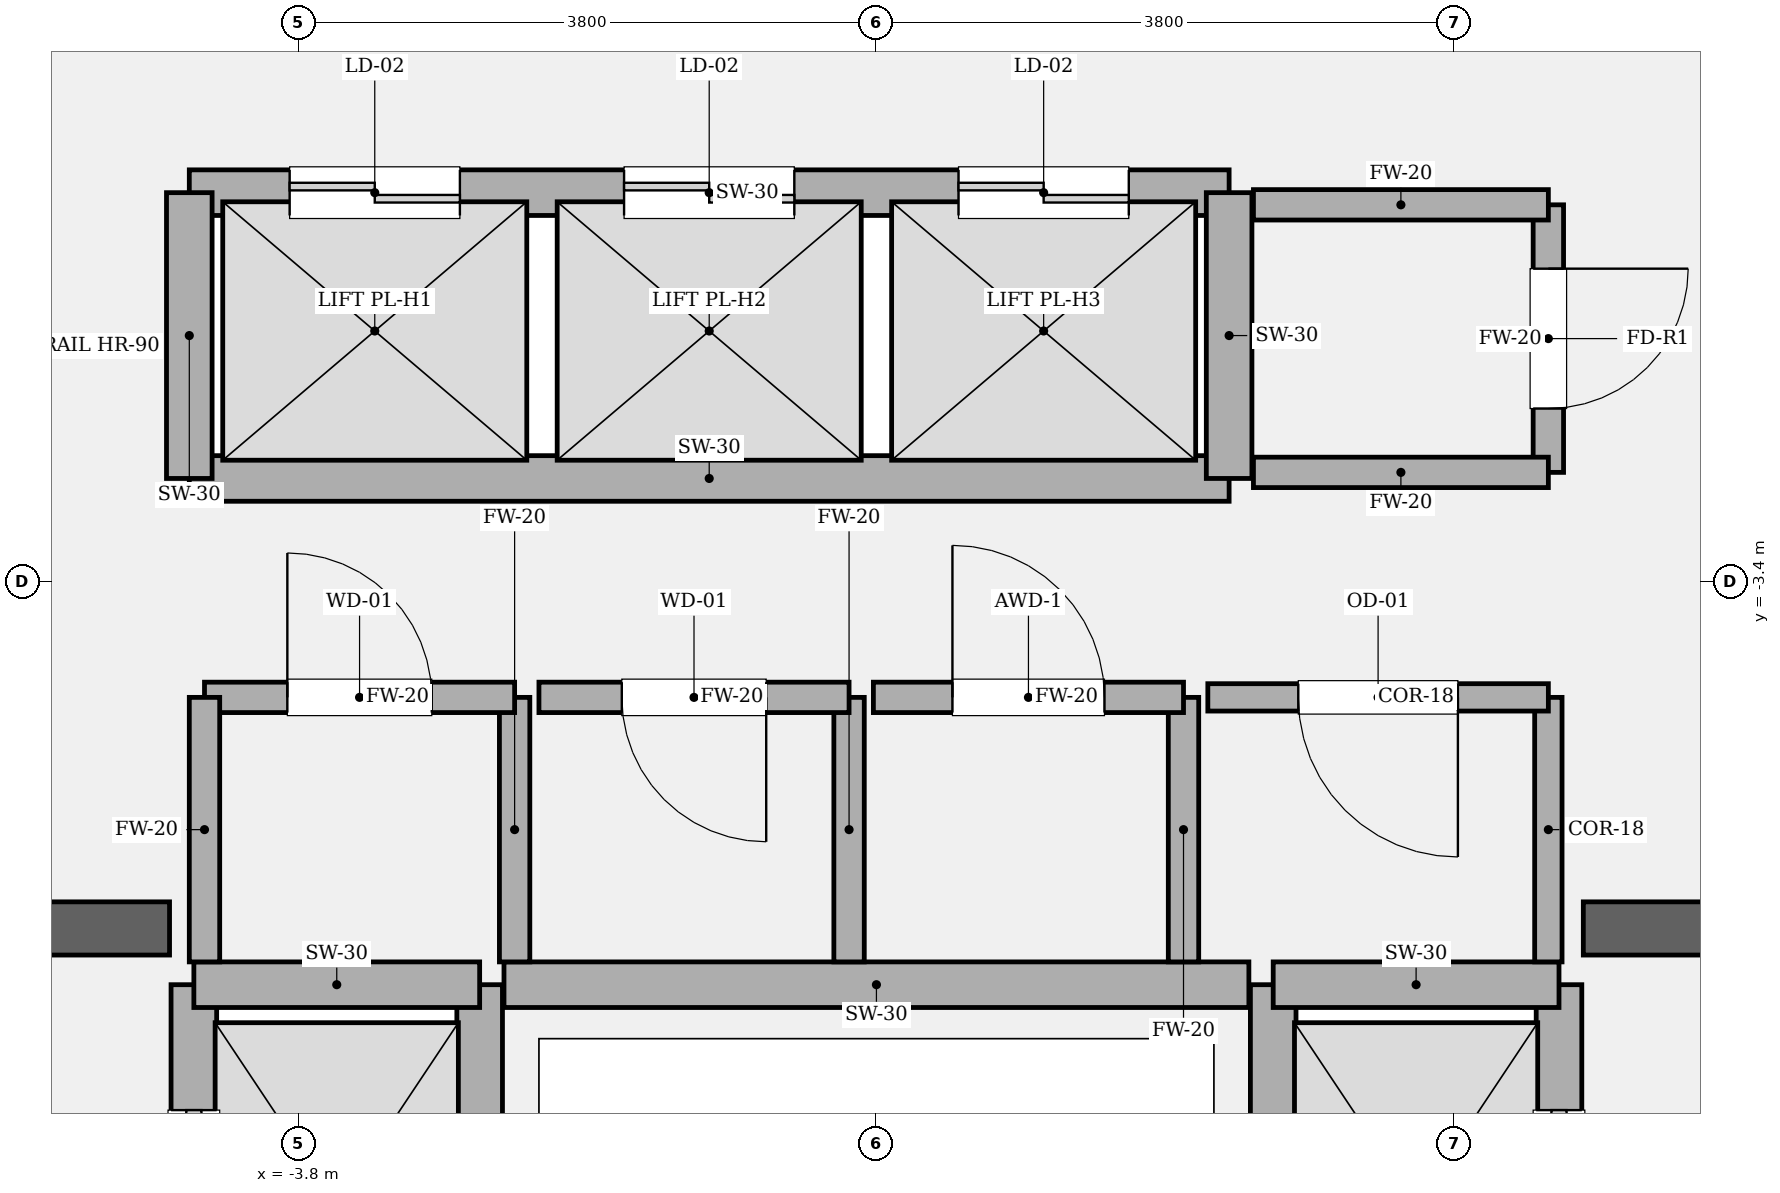
"""IFC4 building model, lengths in metres.
Left out: names, types, materials, properties, quantities, classifications, styles, units other than length and angle.
Written with IfcOpenShell. Run it as: python <this file> out.ifc"""

import sys

from ifc_helpers import new_model, si_unit, direction, frame, frame_2d, origin, place, context, subcontext, project, spatial, rectangle, extrude, element, fill, save


model = new_model("IFC4")
c1 = context("Model", 3, precision=1e-05, world=origin(), true_north=direction((0.0, 1.0)))
c2 = subcontext(c1, "Body", "Model", "MODEL_VIEW")
j1 = project(units=[si_unit("LENGTHUNIT", "METRE"), si_unit("PLANEANGLEUNIT", "RADIAN")], contexts=[c1])
p1 = place(None, origin())
s1 = spatial("IfcSite", under=j1, at=p1, CompositionType="ELEMENT")
p2 = place(p1, origin())
s2 = spatial("IfcBuilding", under=s1, at=p2, CompositionType="ELEMENT")
p3 = place(p2, frame((0.0, 0.0, 279.75)))
s3 = spatial("IfcBuildingStorey", under=s2, at=p3, CompositionType="ELEMENT", Elevation=279.75)
p4 = place(p3, frame((-9.925, -5.68, 0.0), z_axis=(0.0, 0.0, 1.0), x_axis=(1.0, 0.0, 0.0)))
e1 = element("IfcWall", 1, at=p4, inside=s3, PredefinedType="SOLIDWALL", context=c2, shape_type="SweptSolid", body=[
    extrude(rectangle(XDim=5.275, YDim=0.35, at=frame_2d((2.638, 0.0))), origin(), (0.0, 0.0, 1.0), 4.05),
])
p5 = place(p4, frame((1.385, 0.0, 0.0)))
e2 = element("IfcOpeningElement", 2, at=p5, cuts=e1, PredefinedType="OPENING", context=c2, shape_type="SweptSolid", body=[
    extrude(rectangle(XDim=1.18, YDim=2.2, at=frame_2d((0.59, 1.1))), frame((0.0, 0.185, 0.0), z_axis=(0.0, -1.0, 0.0), x_axis=(1.0, 0.0, 0.0)), (0.0, 0.0, 1.0), 0.37),
])
p6 = place(p3, frame((4.65, -5.68, 0.0), z_axis=(0.0, 0.0, 1.0), x_axis=(1.0, 0.0, 0.0)))
e3 = element("IfcWall", 3, at=p6, inside=s3, PredefinedType="SOLIDWALL", context=c2, shape_type="SweptSolid", body=[
    extrude(rectangle(XDim=5.275, YDim=0.35, at=frame_2d((2.638, 0.0))), origin(), (0.0, 0.0, 1.0), 4.05),
])
p7 = place(p6, frame((2.71, 0.0, 0.0)))
e4 = element("IfcOpeningElement", 4, at=p7, cuts=e3, PredefinedType="OPENING", context=c2, shape_type="SweptSolid", body=[
    extrude(rectangle(XDim=1.18, YDim=2.2, at=frame_2d((0.59, 1.1))), frame((0.0, 0.185, 0.0), z_axis=(0.0, -1.0, 0.0), x_axis=(1.0, 0.0, 0.0)), (0.0, 0.0, 1.0), 0.37),
])
p8 = place(p3, frame((-4.49, -8.82, 0.0), z_axis=(0.0, 0.0, 1.0), x_axis=(0.0, 1.0, 0.0)))
e5 = element("IfcWall", 5, at=p8, inside=s3, PredefinedType="SOLIDWALL", context=c2, shape_type="SweptSolid", body=[
    extrude(rectangle(XDim=2.77, YDim=0.3, at=frame_2d((1.385, 0.0))), origin(), (0.0, 0.0, 1.0), 3.77),
])
p9 = place(p8, frame((0.825, 0.0, 0.0)))
e6 = element("IfcOpeningElement", 6, at=p9, cuts=e5, PredefinedType="OPENING", context=c2, shape_type="SweptSolid", body=[
    extrude(rectangle(XDim=1.12, YDim=2.25, at=frame_2d((0.56, 1.125))), frame((0.0, 0.16, 0.0), z_axis=(0.0, -1.0, 0.0), x_axis=(1.0, 0.0, 0.0)), (0.0, 0.0, 1.0), 0.32),
])
p10 = place(p3, frame((-2.61, -8.82, 0.0), z_axis=(0.0, 0.0, 1.0), x_axis=(0.0, 1.0, 0.0)))
e7 = element("IfcWall", 7, at=p10, inside=s3, PredefinedType="SOLIDWALL", context=c2, shape_type="SweptSolid", body=[
    extrude(rectangle(XDim=2.77, YDim=0.3, at=frame_2d((1.385, 0.0))), origin(), (0.0, 0.0, 1.0), 3.77),
])
p11 = place(p3, frame((-4.49, -6.05, 0.0), z_axis=(0.0, 0.0, 1.0), x_axis=(1.0, 0.0, 0.0)))
e8 = element("IfcWall", 8, at=p11, inside=s3, PredefinedType="SOLIDWALL", context=c2, shape_type="SweptSolid", body=[
    extrude(rectangle(XDim=1.88, YDim=0.3, at=frame_2d((0.94, 0.0))), origin(), (0.0, 0.0, 1.0), 3.77),
])
p12 = place(p3, frame((4.49, -8.82, 0.0), z_axis=(0.0, 0.0, 1.0), x_axis=(0.0, 1.0, 0.0)))
e9 = element("IfcWall", 9, at=p12, inside=s3, PredefinedType="SOLIDWALL", context=c2, shape_type="SweptSolid", body=[
    extrude(rectangle(XDim=2.77, YDim=0.3, at=frame_2d((1.385, 0.0))), origin(), (0.0, 0.0, 1.0), 3.77),
])
p13 = place(p12, frame((0.825, 0.0, 0.0)))
e10 = element("IfcOpeningElement", 10, at=p13, cuts=e9, PredefinedType="OPENING", context=c2, shape_type="SweptSolid", body=[
    extrude(rectangle(XDim=1.12, YDim=2.25, at=frame_2d((0.56, 1.125))), frame((0.0, 0.16, 0.0), z_axis=(0.0, -1.0, 0.0), x_axis=(1.0, 0.0, 0.0)), (0.0, 0.0, 1.0), 0.32),
])
p14 = place(p3, frame((2.61, -8.82, 0.0), z_axis=(0.0, 0.0, 1.0), x_axis=(0.0, 1.0, 0.0)))
e11 = element("IfcWall", 11, at=p14, inside=s3, PredefinedType="SOLIDWALL", context=c2, shape_type="SweptSolid", body=[
    extrude(rectangle(XDim=2.77, YDim=0.3, at=frame_2d((1.385, 0.0))), origin(), (0.0, 0.0, 1.0), 3.77),
])
p15 = place(p3, frame((2.61, -6.05, 0.0), z_axis=(0.0, 0.0, 1.0), x_axis=(1.0, 0.0, 0.0)))
e12 = element("IfcWall", 12, at=p15, inside=s3, PredefinedType="SOLIDWALL", context=c2, shape_type="SweptSolid", body=[
    extrude(rectangle(XDim=1.88, YDim=0.3, at=frame_2d((0.94, 0.0))), origin(), (0.0, 0.0, 1.0), 3.77),
])
p16 = place(p3, frame((-4.52, -0.84, 0.0), z_axis=(0.0, 0.0, 1.0), x_axis=(1.0, 0.0, 0.0)))
e13 = element("IfcWall", 13, at=p16, inside=s3, PredefinedType="SOLIDWALL", context=c2, shape_type="SweptSolid", body=[
    extrude(rectangle(XDim=6.84, YDim=0.3, at=frame_2d((3.42, 0.0))), origin(), (0.0, 0.0, 1.0), 3.77),
])
p17 = place(p16, frame((0.66, 0.0, 0.0)))
e14 = element("IfcOpeningElement", 14, at=p17, cuts=e13, PredefinedType="OPENING", context=c2, shape_type="SweptSolid", body=[
    extrude(rectangle(XDim=1.12, YDim=2.25, at=frame_2d((0.56, 1.125))), frame((0.0, 0.16, 0.0), z_axis=(0.0, -1.0, 0.0), x_axis=(1.0, 0.0, 0.0)), (0.0, 0.0, 1.0), 0.32),
])
p18 = place(p16, frame((2.86, 0.0, 0.0)))
e15 = element("IfcOpeningElement", 15, at=p18, cuts=e13, PredefinedType="OPENING", context=c2, shape_type="SweptSolid", body=[
    extrude(rectangle(XDim=1.12, YDim=2.25, at=frame_2d((0.56, 1.125))), frame((0.0, 0.16, 0.0), z_axis=(0.0, -1.0, 0.0), x_axis=(1.0, 0.0, 0.0)), (0.0, 0.0, 1.0), 0.32),
])
p19 = place(p16, frame((5.06, 0.0, 0.0)))
e16 = element("IfcOpeningElement", 16, at=p19, cuts=e13, PredefinedType="OPENING", context=c2, shape_type="SweptSolid", body=[
    extrude(rectangle(XDim=1.12, YDim=2.25, at=frame_2d((0.56, 1.125))), frame((0.0, 0.16, 0.0), z_axis=(0.0, -1.0, 0.0), x_axis=(1.0, 0.0, 0.0)), (0.0, 0.0, 1.0), 0.32),
])
p20 = place(p3, frame((-4.52, -2.72, 0.0), z_axis=(0.0, 0.0, 1.0), x_axis=(1.0, 0.0, 0.0)))
e17 = element("IfcWall", 17, at=p20, inside=s3, PredefinedType="SOLIDWALL", context=c2, shape_type="SweptSolid", body=[
    extrude(rectangle(XDim=6.84, YDim=0.3, at=frame_2d((3.42, 0.0))), origin(), (0.0, 0.0, 1.0), 3.77),
])
for number, where, z_axis, x_axis in (
    (18, (-4.52, -2.72, 0.0), (0.0, 0.0, 1.0), (0.0, 1.0, 0.0)),
    (19, (2.32, -2.72, 0.0), (0.0, 0.0, 1.0), (0.0, 1.0, 0.0)),
):
    element("IfcWall", number, at=place(p3, frame(where, z_axis=z_axis, x_axis=x_axis)), inside=s3, PredefinedType="SOLIDWALL", context=c2, shape_type="SweptSolid", body=[
        extrude(rectangle(XDim=1.88, YDim=0.3, at=frame_2d((0.94, 0.0))), origin(), (0.0, 0.0, 1.0), 3.77),
    ])
p21 = place(p3, frame((-2.45, -6.05, 0.0), z_axis=(0.0, 0.0, 1.0), x_axis=(1.0, 0.0, 0.0)))
e20 = element("IfcWall", 20, at=p21, inside=s3, PredefinedType="SOLIDWALL", context=c2, shape_type="SweptSolid", body=[
    extrude(rectangle(XDim=4.9, YDim=0.3, at=frame_2d((2.45, 0.0))), origin(), (0.0, 0.0, 1.0), 3.77),
])
p22 = place(p3, frame((-2.38, -5.9, 0.0), z_axis=(0.0, 0.0, 1.0), x_axis=(0.0, 1.0, 0.0)))
e21 = element("IfcWall", 21, at=p22, inside=s3, PredefinedType="SOLIDWALL", context=c2, shape_type="SweptSolid", body=[
    extrude(rectangle(XDim=1.74, YDim=0.2, at=frame_2d((0.87, 0.0))), origin(), (0.0, 0.0, 1.0), 3.77),
])
p23 = place(p3, frame((-2.38, -4.16, 0.0), z_axis=(0.0, 0.0, 1.0), x_axis=(-1.0, 0.0, 0.0)))
e22 = element("IfcWall", 22, at=p23, inside=s3, PredefinedType="SOLIDWALL", context=c2, shape_type="SweptSolid", body=[
    extrude(rectangle(XDim=2.04, YDim=0.2, at=frame_2d((1.02, 0.0))), origin(), (0.0, 0.0, 1.0), 3.77),
])
p24 = place(p23, frame((0.545, 0.0, 0.0)))
e23 = element("IfcOpeningElement", 23, at=p24, cuts=e22, PredefinedType="OPENING", context=c2, shape_type="SweptSolid", body=[
    extrude(rectangle(XDim=0.95, YDim=2.15, at=frame_2d((0.475, 1.075))), frame((0.0, 0.11, 0.0), z_axis=(0.0, -1.0, 0.0), x_axis=(1.0, 0.0, 0.0)), (0.0, 0.0, 1.0), 0.22),
])
for number, where, z_axis, x_axis in (
    (24, (-4.42, -4.16, 0.0), (0.0, 0.0, 1.0), (0.0, -1.0, 0.0)),
    (25, (-0.18, -5.9, 0.0), (0.0, 0.0, 1.0), (0.0, 1.0, 0.0)),
):
    element("IfcWall", number, at=place(p3, frame(where, z_axis=z_axis, x_axis=x_axis)), inside=s3, PredefinedType="SOLIDWALL", context=c2, shape_type="SweptSolid", body=[
        extrude(rectangle(XDim=1.74, YDim=0.2, at=frame_2d((0.87, 0.0))), origin(), (0.0, 0.0, 1.0), 3.77),
    ])
p25 = place(p3, frame((-0.18, -4.16, 0.0), z_axis=(0.0, 0.0, 1.0), x_axis=(-1.0, 0.0, 0.0)))
e26 = element("IfcWall", 26, at=p25, inside=s3, PredefinedType="SOLIDWALL", context=c2, shape_type="SweptSolid", body=[
    extrude(rectangle(XDim=2.04, YDim=0.2, at=frame_2d((1.02, 0.0))), origin(), (0.0, 0.0, 1.0), 3.77),
])
p26 = place(p25, frame((0.545, 0.0, 0.0)))
e27 = element("IfcOpeningElement", 27, at=p26, cuts=e26, PredefinedType="OPENING", context=c2, shape_type="SweptSolid", body=[
    extrude(rectangle(XDim=0.95, YDim=2.15, at=frame_2d((0.475, 1.075))), frame((0.0, 0.11, 0.0), z_axis=(0.0, -1.0, 0.0), x_axis=(1.0, 0.0, 0.0)), (0.0, 0.0, 1.0), 0.22),
])
p27 = place(p3, frame((2.02, -5.9, 0.0), z_axis=(0.0, 0.0, 1.0), x_axis=(0.0, 1.0, 0.0)))
e28 = element("IfcWall", 28, at=p27, inside=s3, PredefinedType="SOLIDWALL", context=c2, shape_type="SweptSolid", body=[
    extrude(rectangle(XDim=1.74, YDim=0.2, at=frame_2d((0.87, 0.0))), origin(), (0.0, 0.0, 1.0), 3.77),
])
p28 = place(p3, frame((2.02, -4.16, 0.0), z_axis=(0.0, 0.0, 1.0), x_axis=(-1.0, 0.0, 0.0)))
e29 = element("IfcWall", 29, at=p28, inside=s3, PredefinedType="SOLIDWALL", context=c2, shape_type="SweptSolid", body=[
    extrude(rectangle(XDim=2.04, YDim=0.2, at=frame_2d((1.02, 0.0))), origin(), (0.0, 0.0, 1.0), 3.77),
])
p29 = place(p28, frame((0.52, 0.0, 0.0)))
e30 = element("IfcOpeningElement", 30, at=p29, cuts=e29, PredefinedType="OPENING", context=c2, shape_type="SweptSolid", body=[
    extrude(rectangle(XDim=1.0, YDim=2.15, at=frame_2d((0.5, 1.075))), frame((0.0, 0.11, 0.0), z_axis=(0.0, -1.0, 0.0), x_axis=(1.0, 0.0, 0.0)), (0.0, 0.0, 1.0), 0.22),
])
p30 = place(p3, frame((4.42, -5.9, 0.0), z_axis=(0.0, 0.0, 1.0), x_axis=(0.0, 1.0, 0.0)))
e31 = element("IfcWall", 31, at=p30, inside=s3, PredefinedType="PARTITIONING", context=c2, shape_type="SweptSolid", body=[
    extrude(rectangle(XDim=1.74, YDim=0.18, at=frame_2d((0.87, 0.0))), origin(), (0.0, 0.0, 1.0), 3.77),
])
p31 = place(p3, frame((4.42, -4.16, 0.0), z_axis=(0.0, 0.0, 1.0), x_axis=(-1.0, 0.0, 0.0)))
e32 = element("IfcWall", 32, at=p31, inside=s3, PredefinedType="PARTITIONING", context=c2, shape_type="SweptSolid", body=[
    extrude(rectangle(XDim=2.24, YDim=0.18, at=frame_2d((1.12, 0.0))), origin(), (0.0, 0.0, 1.0), 3.77),
])
p32 = place(p31, frame((0.595, 0.0, 0.0)))
e33 = element("IfcOpeningElement", 33, at=p32, cuts=e32, PredefinedType="OPENING", context=c2, shape_type="SweptSolid", body=[
    extrude(rectangle(XDim=1.05, YDim=2.2, at=frame_2d((0.525, 1.1))), frame((0.0, 0.1, 0.0), z_axis=(0.0, -1.0, 0.0), x_axis=(1.0, 0.0, 0.0)), (0.0, 0.0, 1.0), 0.2),
])
p33 = place(p3, frame((4.42, -2.68, 0.0), z_axis=(0.0, 0.0, 1.0), x_axis=(0.0, 1.0, 0.0)))
e34 = element("IfcWall", 34, at=p33, inside=s3, PredefinedType="SOLIDWALL", context=c2, shape_type="SweptSolid", body=[
    extrude(rectangle(XDim=1.76, YDim=0.2, at=frame_2d((0.88, 0.0))), origin(), (0.0, 0.0, 1.0), 3.77),
])
p34 = place(p33, frame((0.42, 0.0, 0.0)))
e35 = element("IfcOpeningElement", 35, at=p34, cuts=e34, PredefinedType="OPENING", context=c2, shape_type="SweptSolid", body=[
    extrude(rectangle(XDim=0.92, YDim=2.1, at=frame_2d((0.46, 1.05))), frame((0.0, 0.11, 0.0), z_axis=(0.0, -1.0, 0.0), x_axis=(1.0, 0.0, 0.0)), (0.0, 0.0, 1.0), 0.22),
])
for number, where, z_axis, x_axis in (
    (36, (4.42, -0.92, 0.0), (0.0, 0.0, 1.0), (-1.0, 0.0, 0.0)),
    (37, (2.48, -2.68, 0.0), (0.0, 0.0, 1.0), (1.0, 0.0, 0.0)),
):
    element("IfcWall", number, at=place(p3, frame(where, z_axis=z_axis, x_axis=x_axis)), inside=s3, PredefinedType="SOLIDWALL", context=c2, shape_type="SweptSolid", body=[
        extrude(rectangle(XDim=1.94, YDim=0.2, at=frame_2d((0.97, 0.0))), origin(), (0.0, 0.0, 1.0), 3.77),
    ])
p35 = place(p9, origin())
e38 = element("IfcDoor", 38, at=p35, inside=s3, OperationType="SLIDING_TO_LEFT", PredefinedType="DOOR", context=c2, shape_type="SweptSolid", body=[
    extrude(rectangle(XDim=1.12, YDim=2.25, at=frame_2d((0.56, 1.125))), frame((0.0, 0.025, 0.0), z_axis=(0.0, -1.0, 0.0), x_axis=(1.0, 0.0, 0.0)), (0.0, 0.0, 1.0), 0.05),
])
fill(e6, e38)
p36 = place(p13, origin())
e39 = element("IfcDoor", 39, at=p36, inside=s3, OperationType="SLIDING_TO_RIGHT", PredefinedType="DOOR", context=c2, shape_type="SweptSolid", body=[
    extrude(rectangle(XDim=1.12, YDim=2.25, at=frame_2d((0.56, 1.125))), frame((0.0, 0.025, 0.0), z_axis=(0.0, -1.0, 0.0), x_axis=(1.0, 0.0, 0.0)), (0.0, 0.0, 1.0), 0.05),
])
fill(e10, e39)
p37 = place(p17, origin())
e40 = element("IfcDoor", 40, at=p37, inside=s3, OperationType="DOUBLE_DOOR_SLIDING", PredefinedType="DOOR", context=c2, shape_type="SweptSolid", body=[
    extrude(rectangle(XDim=1.12, YDim=2.25, at=frame_2d((0.56, 1.125))), frame((0.0, 0.025, 0.0), z_axis=(0.0, -1.0, 0.0), x_axis=(1.0, 0.0, 0.0)), (0.0, 0.0, 1.0), 0.05),
])
fill(e14, e40)
p38 = place(p18, origin())
e41 = element("IfcDoor", 41, at=p38, inside=s3, OperationType="DOUBLE_DOOR_SLIDING", PredefinedType="DOOR", context=c2, shape_type="SweptSolid", body=[
    extrude(rectangle(XDim=1.12, YDim=2.25, at=frame_2d((0.56, 1.125))), frame((0.0, 0.025, 0.0), z_axis=(0.0, -1.0, 0.0), x_axis=(1.0, 0.0, 0.0)), (0.0, 0.0, 1.0), 0.05),
])
fill(e15, e41)
p39 = place(p19, origin())
e42 = element("IfcDoor", 42, at=p39, inside=s3, OperationType="DOUBLE_DOOR_SLIDING", PredefinedType="DOOR", context=c2, shape_type="SweptSolid", body=[
    extrude(rectangle(XDim=1.12, YDim=2.25, at=frame_2d((0.56, 1.125))), frame((0.0, 0.025, 0.0), z_axis=(0.0, -1.0, 0.0), x_axis=(1.0, 0.0, 0.0)), (0.0, 0.0, 1.0), 0.05),
])
fill(e16, e42)
p40 = place(p24, origin())
e43 = element("IfcDoor", 43, at=p40, inside=s3, OperationType="SINGLE_SWING_RIGHT", PredefinedType="DOOR", context=c2, shape_type="SweptSolid", body=[
    extrude(rectangle(XDim=0.95, YDim=2.15, at=frame_2d((0.475, 1.075))), frame((0.0, 0.025, 0.0), z_axis=(0.0, -1.0, 0.0), x_axis=(1.0, 0.0, 0.0)), (0.0, 0.0, 1.0), 0.05),
])
fill(e23, e43)
p41 = place(p26, origin())
e44 = element("IfcDoor", 44, at=p41, inside=s3, OperationType="SINGLE_SWING_LEFT", PredefinedType="DOOR", context=c2, shape_type="SweptSolid", body=[
    extrude(rectangle(XDim=0.95, YDim=2.15, at=frame_2d((0.475, 1.075))), frame((0.0, 0.025, 0.0), z_axis=(0.0, -1.0, 0.0), x_axis=(1.0, 0.0, 0.0)), (0.0, 0.0, 1.0), 0.05),
])
fill(e27, e44)
p42 = place(p29, origin())
e45 = element("IfcDoor", 45, at=p42, inside=s3, OperationType="SINGLE_SWING_RIGHT", PredefinedType="DOOR", context=c2, shape_type="SweptSolid", body=[
    extrude(rectangle(XDim=1.0, YDim=2.15, at=frame_2d((0.5, 1.075))), frame((0.0, 0.025, 0.0), z_axis=(0.0, -1.0, 0.0), x_axis=(1.0, 0.0, 0.0)), (0.0, 0.0, 1.0), 0.05),
])
fill(e30, e45)
p43 = place(p32, origin())
e46 = element("IfcDoor", 46, at=p43, inside=s3, OperationType="SINGLE_SWING_LEFT", PredefinedType="DOOR", context=c2, shape_type="SweptSolid", body=[
    extrude(rectangle(XDim=1.05, YDim=2.2, at=frame_2d((0.525, 1.1))), frame((0.0, 0.025, 0.0), z_axis=(0.0, -1.0, 0.0), x_axis=(1.0, 0.0, 0.0)), (0.0, 0.0, 1.0), 0.05),
])
fill(e33, e46)
p44 = place(p34, origin())
e47 = element("IfcDoor", 47, at=p44, inside=s3, OperationType="SINGLE_SWING_RIGHT", PredefinedType="DOOR", context=c2, shape_type="SweptSolid", body=[
    extrude(rectangle(XDim=0.92, YDim=2.1, at=frame_2d((0.46, 1.05))), frame((0.0, 0.025, 0.0), z_axis=(0.0, -1.0, 0.0), x_axis=(1.0, 0.0, 0.0)), (0.0, 0.0, 1.0), 0.05),
])
fill(e35, e47)
save(model, sys.argv[1])
